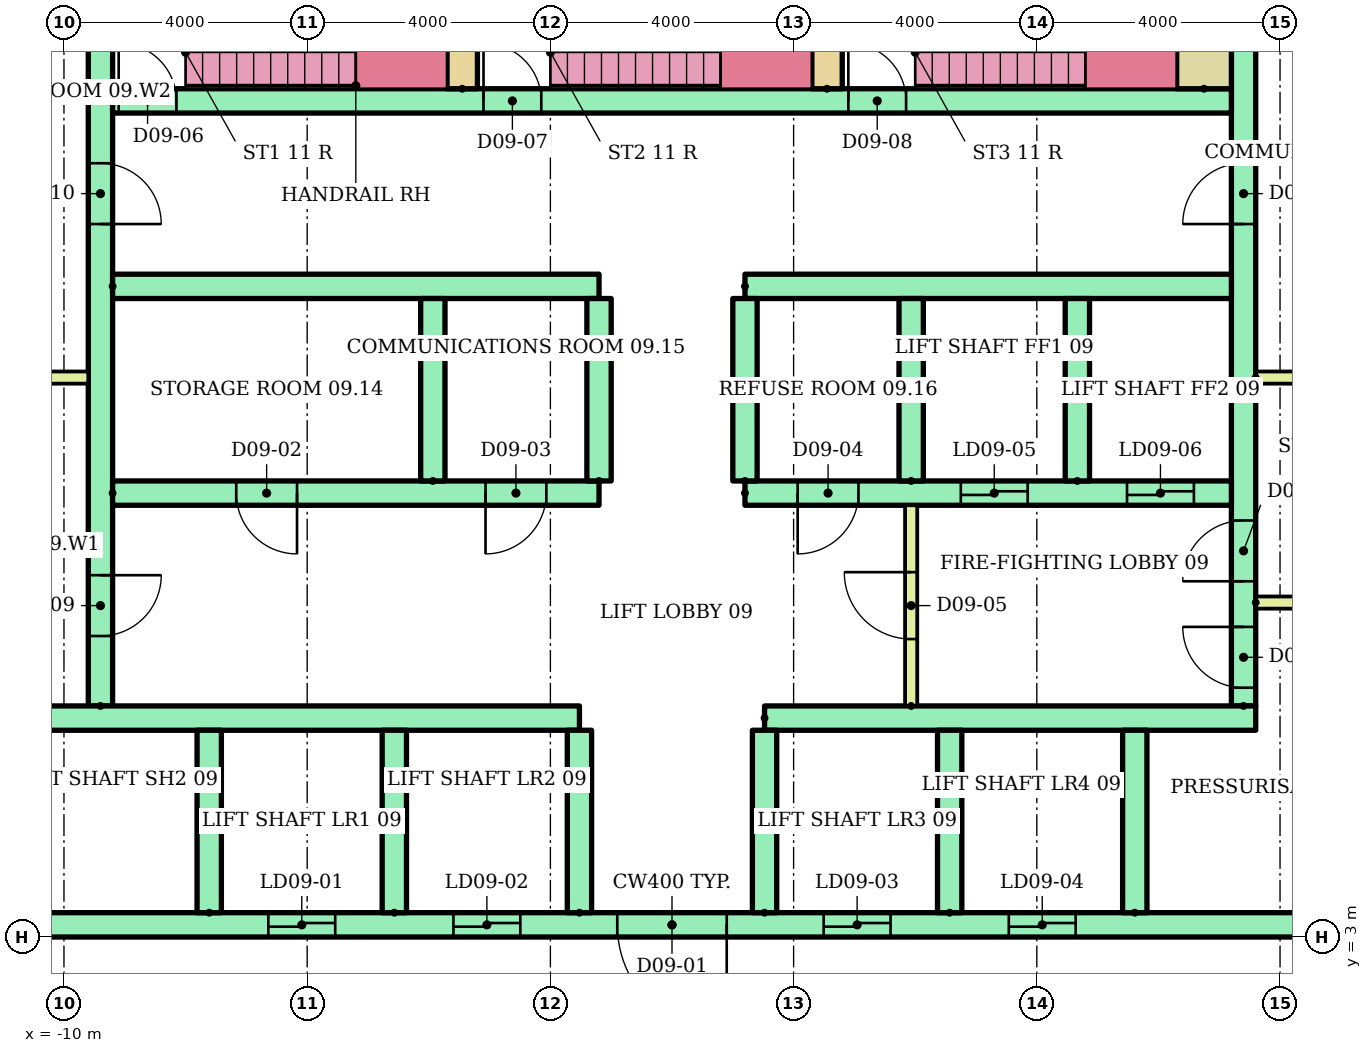
"""IFC4 building model, lengths in metres.
Left out: names, types, materials, properties, quantities, classifications, styles, units other than length and angle.
Written with IfcOpenShell. Run it as: python <this file> out.ifc"""

import sys

from ifc_helpers import new_model, si_unit, direction, frame, frame_2d, origin, place, context, subcontext, project, spatial, rectangle, extrude, element, fill, save


model = new_model("IFC4")
c1 = context("Model", 3, precision=1e-05, world=origin(), true_north=direction((0.0, 1.0)))
c2 = subcontext(c1, "Body", "Model", "MODEL_VIEW")
j1 = project(units=[si_unit("LENGTHUNIT", "METRE"), si_unit("PLANEANGLEUNIT", "RADIAN")], contexts=[c1])
p1 = place(None, origin())
s1 = spatial("IfcSite", under=j1, at=p1, CompositionType="ELEMENT")
p2 = place(p1, origin())
s2 = spatial("IfcBuilding", under=s1, at=p2, CompositionType="ELEMENT")
p3 = place(p2, frame((0.0, 0.0, 37.7)))
s3 = spatial("IfcBuildingStorey", under=s2, at=p3, CompositionType="ELEMENT", Elevation=37.7)
p4 = place(p3, frame((-9.4, 6.8, 0.0), z_axis=(0.0, 0.0, 1.0), x_axis=(0.0, 1.0, 0.0)))
e1 = element("IfcWall", 1, at=p4, inside=s3, PredefinedType="SHEAR", context=c2, shape_type="SweptSolid", body=[
    extrude(rectangle(XDim=12.7, YDim=0.4, at=frame_2d((6.35, 0.0))), origin(), (0.0, 0.0, 1.0), 3.62),
])
p5 = place(p4, frame((1.15, 0.0, 0.0)))
e2 = element("IfcOpeningElement", 2, at=p5, cuts=e1, PredefinedType="OPENING", context=c2, shape_type="SweptSolid", body=[
    extrude(rectangle(XDim=1.0, YDim=2.1, at=frame_2d((0.5, 1.05))), frame((0.0, 0.21, 0.0), z_axis=(0.0, -1.0, 0.0), x_axis=(1.0, 0.0, 0.0)), (0.0, 0.0, 1.0), 0.42),
])
p6 = place(p4, frame((7.925, 0.0, 0.0)))
e3 = element("IfcOpeningElement", 3, at=p6, cuts=e1, PredefinedType="OPENING", context=c2, shape_type="SweptSolid", body=[
    extrude(rectangle(XDim=1.0, YDim=2.1, at=frame_2d((0.5, 1.05))), frame((0.0, 0.21, 0.0), z_axis=(0.0, -1.0, 0.0), x_axis=(1.0, 0.0, 0.0)), (0.0, 0.0, 1.0), 0.42),
])
p7 = place(p3, frame((9.4, 6.8, 0.0), z_axis=(0.0, 0.0, 1.0), x_axis=(0.0, 1.0, 0.0)))
e4 = element("IfcWall", 4, at=p7, inside=s3, PredefinedType="SHEAR", context=c2, shape_type="SweptSolid", body=[
    extrude(rectangle(XDim=12.7, YDim=0.4, at=frame_2d((6.35, 0.0))), origin(), (0.0, 0.0, 1.0), 3.62),
])
p8 = place(p7, frame((0.3, 0.0, 0.0)))
e5 = element("IfcOpeningElement", 5, at=p8, cuts=e4, PredefinedType="OPENING", context=c2, shape_type="SweptSolid", body=[
    extrude(rectangle(XDim=1.0, YDim=2.1, at=frame_2d((0.5, 1.05))), frame((0.0, 0.21, 0.0), z_axis=(0.0, -1.0, 0.0), x_axis=(1.0, 0.0, 0.0)), (0.0, 0.0, 1.0), 0.42),
])
p9 = place(p7, frame((2.05, 0.0, 0.0)))
e6 = element("IfcOpeningElement", 6, at=p9, cuts=e4, PredefinedType="OPENING", context=c2, shape_type="SweptSolid", body=[
    extrude(rectangle(XDim=1.0, YDim=2.1, at=frame_2d((0.5, 1.05))), frame((0.0, 0.21, 0.0), z_axis=(0.0, -1.0, 0.0), x_axis=(1.0, 0.0, 0.0)), (0.0, 0.0, 1.0), 0.42),
])
p10 = place(p7, frame((7.925, 0.0, 0.0)))
e7 = element("IfcOpeningElement", 7, at=p10, cuts=e4, PredefinedType="OPENING", context=c2, shape_type="SweptSolid", body=[
    extrude(rectangle(XDim=1.0, YDim=2.1, at=frame_2d((0.5, 1.05))), frame((0.0, 0.21, 0.0), z_axis=(0.0, -1.0, 0.0), x_axis=(1.0, 0.0, 0.0)), (0.0, 0.0, 1.0), 0.42),
])
p11 = place(p3, frame((-13.5, 3.2, 0.0)))
e8 = element("IfcWall", 8, at=p11, inside=s3, PredefinedType="SHEAR", context=c2, shape_type="SweptSolid", body=[
    extrude(rectangle(XDim=27.0, YDim=0.4, at=frame_2d((13.5, 0.0))), origin(), (0.0, 0.0, 1.0), 3.62),
])
p12 = place(p11, frame((6.861, 0.0, 0.0)))
e9 = element("IfcOpeningElement", 9, at=p12, cuts=e8, PredefinedType="OPENING", context=c2, shape_type="SweptSolid", body=[
    extrude(rectangle(XDim=1.1, YDim=2.1, at=frame_2d((0.55, 1.05))), frame((0.0, 0.21, 0.0), z_axis=(0.0, -1.0, 0.0), x_axis=(1.0, 0.0, 0.0)), (0.0, 0.0, 1.0), 0.42),
])
p13 = place(p11, frame((9.906, 0.0, 0.0)))
e10 = element("IfcOpeningElement", 10, at=p13, cuts=e8, PredefinedType="OPENING", context=c2, shape_type="SweptSolid", body=[
    extrude(rectangle(XDim=1.1, YDim=2.1, at=frame_2d((0.55, 1.05))), frame((0.0, 0.21, 0.0), z_axis=(0.0, -1.0, 0.0), x_axis=(1.0, 0.0, 0.0)), (0.0, 0.0, 1.0), 0.42),
])
p14 = place(p11, frame((15.994, 0.0, 0.0)))
e11 = element("IfcOpeningElement", 11, at=p14, cuts=e8, PredefinedType="OPENING", context=c2, shape_type="SweptSolid", body=[
    extrude(rectangle(XDim=1.1, YDim=2.1, at=frame_2d((0.55, 1.05))), frame((0.0, 0.21, 0.0), z_axis=(0.0, -1.0, 0.0), x_axis=(1.0, 0.0, 0.0)), (0.0, 0.0, 1.0), 0.42),
])
p15 = place(p11, frame((19.039, 0.0, 0.0)))
e12 = element("IfcOpeningElement", 12, at=p15, cuts=e8, PredefinedType="OPENING", context=c2, shape_type="SweptSolid", body=[
    extrude(rectangle(XDim=1.1, YDim=2.1, at=frame_2d((0.55, 1.05))), frame((0.0, 0.21, 0.0), z_axis=(0.0, -1.0, 0.0), x_axis=(1.0, 0.0, 0.0)), (0.0, 0.0, 1.0), 0.42),
])
p16 = place(p11, frame((12.6, 0.0, 0.0)))
e13 = element("IfcOpeningElement", 13, at=p16, cuts=e8, PredefinedType="OPENING", context=c2, shape_type="SweptSolid", body=[
    extrude(rectangle(XDim=1.8, YDim=2.1, at=frame_2d((0.9, 1.05))), frame((0.0, 0.21, 0.0), z_axis=(0.0, -1.0, 0.0), x_axis=(1.0, 0.0, 0.0)), (0.0, 0.0, 1.0), 0.42),
])
p17 = place(p3, frame((-13.5, 6.6, 0.0)))
e14 = element("IfcWall", 14, at=p17, inside=s3, PredefinedType="SHEAR", context=c2, shape_type="SweptSolid", body=[
    extrude(rectangle(XDim=11.978, YDim=0.4, at=frame_2d((5.989, 0.0))), origin(), (0.0, 0.0, 1.0), 3.62),
])
p18 = place(p3, frame((1.522, 6.6, 0.0)))
e15 = element("IfcWall", 15, at=p18, inside=s3, PredefinedType="SHEAR", context=c2, shape_type="SweptSolid", body=[
    extrude(rectangle(XDim=8.078, YDim=0.4, at=frame_2d((4.039, 0.0))), origin(), (0.0, 0.0, 1.0), 3.62),
])
for number, where, z_axis, x_axis in (
    (16, (-7.611, 3.4, 0.0), (0.0, 0.0, 1.0), (0.0, 1.0, 0.0)),
    (17, (-4.567, 3.4, 0.0), (0.0, 0.0, 1.0), (0.0, 1.0, 0.0)),
    (18, (-1.522, 3.4, 0.0), (0.0, 0.0, 1.0), (0.0, 1.0, 0.0)),
    (19, (1.522, 3.4, 0.0), (0.0, 0.0, 1.0), (0.0, 1.0, 0.0)),
    (20, (4.567, 3.4, 0.0), (0.0, 0.0, 1.0), (0.0, 1.0, 0.0)),
    (21, (7.611, 3.4, 0.0), (0.0, 0.0, 1.0), (0.0, 1.0, 0.0)),
):
    element("IfcWall", number, at=place(p3, frame(where, z_axis=z_axis, x_axis=x_axis)), inside=s3, PredefinedType="SHEAR", context=c2, shape_type="SweptSolid", body=[
        extrude(rectangle(XDim=3.0, YDim=0.4, at=frame_2d((1.5, 0.0))), origin(), (0.0, 0.0, 1.0), 3.62),
    ])
p19 = place(p3, frame((-9.2, 10.3, 0.0)))
e22 = element("IfcWall", 22, at=p19, inside=s3, PredefinedType="SHEAR", context=c2, shape_type="SweptSolid", body=[
    extrude(rectangle(XDim=8.0, YDim=0.4, at=frame_2d((4.0, 0.0))), origin(), (0.0, 0.0, 1.0), 3.62),
])
p20 = place(p19, frame((2.033, 0.0, 0.0)))
e23 = element("IfcOpeningElement", 23, at=p20, cuts=e22, PredefinedType="OPENING", context=c2, shape_type="SweptSolid", body=[
    extrude(rectangle(XDim=1.0, YDim=2.1, at=frame_2d((0.5, 1.05))), frame((0.0, 0.21, 0.0), z_axis=(0.0, -1.0, 0.0), x_axis=(1.0, 0.0, 0.0)), (0.0, 0.0, 1.0), 0.42),
])
p21 = place(p19, frame((6.133, 0.0, 0.0)))
e24 = element("IfcOpeningElement", 24, at=p21, cuts=e22, PredefinedType="OPENING", context=c2, shape_type="SweptSolid", body=[
    extrude(rectangle(XDim=1.0, YDim=2.1, at=frame_2d((0.5, 1.05))), frame((0.0, 0.21, 0.0), z_axis=(0.0, -1.0, 0.0), x_axis=(1.0, 0.0, 0.0)), (0.0, 0.0, 1.0), 0.42),
])
p22 = place(p3, frame((-9.2, 13.7, 0.0)))
e25 = element("IfcWall", 25, at=p22, inside=s3, PredefinedType="SHEAR", context=c2, shape_type="SweptSolid", body=[
    extrude(rectangle(XDim=8.0, YDim=0.4, at=frame_2d((4.0, 0.0))), origin(), (0.0, 0.0, 1.0), 3.62),
])
p23 = place(p3, frame((1.2, 10.3, 0.0)))
e26 = element("IfcWall", 26, at=p23, inside=s3, PredefinedType="SHEAR", context=c2, shape_type="SweptSolid", body=[
    extrude(rectangle(XDim=8.0, YDim=0.4, at=frame_2d((4.0, 0.0))), origin(), (0.0, 0.0, 1.0), 3.62),
])
p24 = place(p23, frame((3.55, 0.0, 0.0)))
e27 = element("IfcOpeningElement", 27, at=p24, cuts=e26, PredefinedType="OPENING", context=c2, shape_type="SweptSolid", body=[
    extrude(rectangle(XDim=1.1, YDim=2.1, at=frame_2d((0.55, 1.05))), frame((0.0, 0.21, 0.0), z_axis=(0.0, -1.0, 0.0), x_axis=(1.0, 0.0, 0.0)), (0.0, 0.0, 1.0), 0.42),
])
p25 = place(p23, frame((6.283, 0.0, 0.0)))
e28 = element("IfcOpeningElement", 28, at=p25, cuts=e26, PredefinedType="OPENING", context=c2, shape_type="SweptSolid", body=[
    extrude(rectangle(XDim=1.1, YDim=2.1, at=frame_2d((0.55, 1.05))), frame((0.0, 0.21, 0.0), z_axis=(0.0, -1.0, 0.0), x_axis=(1.0, 0.0, 0.0)), (0.0, 0.0, 1.0), 0.42),
])
p26 = place(p23, frame((0.867, 0.0, 0.0)))
e29 = element("IfcOpeningElement", 29, at=p26, cuts=e26, PredefinedType="OPENING", context=c2, shape_type="SweptSolid", body=[
    extrude(rectangle(XDim=1.0, YDim=2.1, at=frame_2d((0.5, 1.05))), frame((0.0, 0.21, 0.0), z_axis=(0.0, -1.0, 0.0), x_axis=(1.0, 0.0, 0.0)), (0.0, 0.0, 1.0), 0.42),
])
p27 = place(p3, frame((1.2, 13.7, 0.0)))
e30 = element("IfcWall", 30, at=p27, inside=s3, PredefinedType="SHEAR", context=c2, shape_type="SweptSolid", body=[
    extrude(rectangle(XDim=8.0, YDim=0.4, at=frame_2d((4.0, 0.0))), origin(), (0.0, 0.0, 1.0), 3.62),
])
for number, where, z_axis, x_axis in (
    (31, (-3.933, 10.5, 0.0), (0.0, 0.0, 1.0), (0.0, 1.0, 0.0)),
    (32, (-1.2, 10.5, 0.0), (0.0, 0.0, 1.0), (0.0, 1.0, 0.0)),
    (33, (1.2, 10.5, 0.0), (0.0, 0.0, 1.0), (0.0, 1.0, 0.0)),
    (34, (3.933, 10.5, 0.0), (0.0, 0.0, 1.0), (0.0, 1.0, 0.0)),
    (35, (6.667, 10.5, 0.0), (0.0, 0.0, 1.0), (0.0, 1.0, 0.0)),
):
    element("IfcWall", number, at=place(p3, frame(where, z_axis=z_axis, x_axis=x_axis)), inside=s3, PredefinedType="SHEAR", context=c2, shape_type="SweptSolid", body=[
        extrude(rectangle(XDim=3.0, YDim=0.4, at=frame_2d((1.5, 0.0))), origin(), (0.0, 0.0, 1.0), 3.62),
    ])
p28 = place(p3, frame((3.933, 6.8, 0.0), z_axis=(0.0, 0.0, 1.0), x_axis=(0.0, 1.0, 0.0)))
e36 = element("IfcWall", 36, at=p28, inside=s3, PredefinedType="PARTITIONING", context=c2, shape_type="SweptSolid", body=[
    extrude(rectangle(XDim=3.3, YDim=0.2, at=frame_2d((1.65, 0.0))), origin(), (0.0, 0.0, 1.0), 3.62),
])
p29 = place(p28, frame((1.1, 0.0, 0.0)))
e37 = element("IfcOpeningElement", 37, at=p29, cuts=e36, PredefinedType="OPENING", context=c2, shape_type="SweptSolid", body=[
    extrude(rectangle(XDim=1.1, YDim=2.1, at=frame_2d((0.55, 1.05))), frame((0.0, 0.11, 0.0), z_axis=(0.0, -1.0, 0.0), x_axis=(1.0, 0.0, 0.0)), (0.0, 0.0, 1.0), 0.22),
])
p30 = place(p3, frame((-9.2, 16.75, 0.0)))
e38 = element("IfcWall", 38, at=p30, inside=s3, PredefinedType="SHEAR", context=c2, shape_type="SweptSolid", body=[
    extrude(rectangle(XDim=18.4, YDim=0.4, at=frame_2d((9.2, 0.0))), origin(), (0.0, 0.0, 1.0), 3.62),
])
p31 = place(p30, frame((0.1, 0.0, 0.0)))
e39 = element("IfcOpeningElement", 39, at=p31, cuts=e38, PredefinedType="OPENING", context=c2, shape_type="SweptSolid", body=[
    extrude(rectangle(XDim=0.95, YDim=2.1, at=frame_2d((0.475, 1.05))), frame((0.0, 0.21, 0.0), z_axis=(0.0, -1.0, 0.0), x_axis=(1.0, 0.0, 0.0)), (0.0, 0.0, 1.0), 0.42),
])
p32 = place(p30, frame((6.1, 0.0, 0.0)))
e40 = element("IfcOpeningElement", 40, at=p32, cuts=e38, PredefinedType="OPENING", context=c2, shape_type="SweptSolid", body=[
    extrude(rectangle(XDim=0.95, YDim=2.1, at=frame_2d((0.475, 1.05))), frame((0.0, 0.21, 0.0), z_axis=(0.0, -1.0, 0.0), x_axis=(1.0, 0.0, 0.0)), (0.0, 0.0, 1.0), 0.42),
])
p33 = place(p30, frame((12.1, 0.0, 0.0)))
e41 = element("IfcOpeningElement", 41, at=p33, cuts=e38, PredefinedType="OPENING", context=c2, shape_type="SweptSolid", body=[
    extrude(rectangle(XDim=0.95, YDim=2.1, at=frame_2d((0.475, 1.05))), frame((0.0, 0.21, 0.0), z_axis=(0.0, -1.0, 0.0), x_axis=(1.0, 0.0, 0.0)), (0.0, 0.0, 1.0), 0.42),
])
for number, where, z_axis, x_axis in (
    (42, (-3.45, 16.95, 0.0), (0.0, 0.0, 1.0), (0.0, 1.0, 0.0)),
    (43, (2.55, 16.95, 0.0), (0.0, 0.0, 1.0), (0.0, 1.0, 0.0)),
):
    element("IfcWall", number, at=place(p3, frame(where, z_axis=z_axis, x_axis=x_axis)), inside=s3, PredefinedType="SHEAR", context=c2, shape_type="SweptSolid", body=[
        extrude(rectangle(XDim=2.55, YDim=0.5, at=frame_2d((1.275, 0.0))), origin(), (0.0, 0.0, 1.0), 3.62),
    ])
p34 = place(p3, frame((8.75, 16.95, 0.0), z_axis=(0.0, 0.0, 1.0), x_axis=(0.0, 1.0, 0.0)))
e44 = element("IfcWall", 44, at=p34, inside=s3, PredefinedType="SHEAR", context=c2, shape_type="SweptSolid", body=[
    extrude(rectangle(XDim=2.55, YDim=0.9, at=frame_2d((1.275, 0.0))), origin(), (0.0, 0.0, 1.0), 3.62),
])
for number, where in (
    (45, (-13.5, 12.2, 0.0)),
    (46, (9.6, 8.5, 0.0)),
    (47, (9.6, 12.2, 0.0)),
):
    element("IfcWall", number, at=place(p3, frame(where)), inside=s3, PredefinedType="PARTITIONING", context=c2, shape_type="SweptSolid", body=[
        extrude(rectangle(XDim=3.9, YDim=0.2, at=frame_2d((1.95, 0.0))), origin(), (0.0, 0.0, 1.0), 3.62),
    ])
p35 = place(p12, origin())
e48 = element("IfcDoor", 48, at=p35, inside=s3, OperationType="SLIDING_TO_LEFT", PredefinedType="DOOR", context=c2, shape_type="SweptSolid", body=[
    extrude(rectangle(XDim=1.1, YDim=2.1, at=frame_2d((0.55, 1.05))), frame((0.0, 0.025, 0.0), z_axis=(0.0, -1.0, 0.0), x_axis=(1.0, 0.0, 0.0)), (0.0, 0.0, 1.0), 0.05),
])
fill(e9, e48)
p36 = place(p13, origin())
e49 = element("IfcDoor", 49, at=p36, inside=s3, OperationType="SLIDING_TO_LEFT", PredefinedType="DOOR", context=c2, shape_type="SweptSolid", body=[
    extrude(rectangle(XDim=1.1, YDim=2.1, at=frame_2d((0.55, 1.05))), frame((0.0, 0.025, 0.0), z_axis=(0.0, -1.0, 0.0), x_axis=(1.0, 0.0, 0.0)), (0.0, 0.0, 1.0), 0.05),
])
fill(e10, e49)
p37 = place(p14, origin())
e50 = element("IfcDoor", 50, at=p37, inside=s3, OperationType="SLIDING_TO_LEFT", PredefinedType="DOOR", context=c2, shape_type="SweptSolid", body=[
    extrude(rectangle(XDim=1.1, YDim=2.1, at=frame_2d((0.55, 1.05))), frame((0.0, 0.025, 0.0), z_axis=(0.0, -1.0, 0.0), x_axis=(1.0, 0.0, 0.0)), (0.0, 0.0, 1.0), 0.05),
])
fill(e11, e50)
p38 = place(p15, origin())
e51 = element("IfcDoor", 51, at=p38, inside=s3, OperationType="SLIDING_TO_LEFT", PredefinedType="DOOR", context=c2, shape_type="SweptSolid", body=[
    extrude(rectangle(XDim=1.1, YDim=2.1, at=frame_2d((0.55, 1.05))), frame((0.0, 0.025, 0.0), z_axis=(0.0, -1.0, 0.0), x_axis=(1.0, 0.0, 0.0)), (0.0, 0.0, 1.0), 0.05),
])
fill(e12, e51)
p39 = place(p16, frame((1.8, 0.0, 0.0), z_axis=(0.0, 0.0, 1.0), x_axis=(-1.0, 0.0, 0.0)))
e52 = element("IfcDoor", 52, at=p39, inside=s3, OperationType="DOUBLE_DOOR_SINGLE_SWING", PredefinedType="DOOR", context=c2, shape_type="SweptSolid", body=[
    extrude(rectangle(XDim=1.8, YDim=2.1, at=frame_2d((0.9, 1.05))), frame((0.0, 0.025, 0.0), z_axis=(0.0, -1.0, 0.0), x_axis=(1.0, 0.0, 0.0)), (0.0, 0.0, 1.0), 0.05),
])
fill(e13, e52)
p40 = place(p24, origin())
e53 = element("IfcDoor", 53, at=p40, inside=s3, OperationType="SLIDING_TO_LEFT", PredefinedType="DOOR", context=c2, shape_type="SweptSolid", body=[
    extrude(rectangle(XDim=1.1, YDim=2.1, at=frame_2d((0.55, 1.05))), frame((0.0, 0.025, 0.0), z_axis=(0.0, -1.0, 0.0), x_axis=(1.0, 0.0, 0.0)), (0.0, 0.0, 1.0), 0.05),
])
fill(e27, e53)
p41 = place(p25, origin())
e54 = element("IfcDoor", 54, at=p41, inside=s3, OperationType="SLIDING_TO_LEFT", PredefinedType="DOOR", context=c2, shape_type="SweptSolid", body=[
    extrude(rectangle(XDim=1.1, YDim=2.1, at=frame_2d((0.55, 1.05))), frame((0.0, 0.025, 0.0), z_axis=(0.0, -1.0, 0.0), x_axis=(1.0, 0.0, 0.0)), (0.0, 0.0, 1.0), 0.05),
])
fill(e28, e54)
p42 = place(p20, frame((1.0, 0.0, 0.0), z_axis=(0.0, 0.0, 1.0), x_axis=(-1.0, 0.0, 0.0)))
e55 = element("IfcDoor", 55, at=p42, inside=s3, OperationType="SINGLE_SWING_RIGHT", PredefinedType="DOOR", context=c2, shape_type="SweptSolid", body=[
    extrude(rectangle(XDim=1.0, YDim=2.1, at=frame_2d((0.5, 1.05))), frame((0.0, 0.025, 0.0), z_axis=(0.0, -1.0, 0.0), x_axis=(1.0, 0.0, 0.0)), (0.0, 0.0, 1.0), 0.05),
])
fill(e23, e55)
p43 = place(p21, frame((1.0, 0.0, 0.0), z_axis=(0.0, 0.0, 1.0), x_axis=(-1.0, 0.0, 0.0)))
e56 = element("IfcDoor", 56, at=p43, inside=s3, OperationType="SINGLE_SWING_LEFT", PredefinedType="DOOR", context=c2, shape_type="SweptSolid", body=[
    extrude(rectangle(XDim=1.0, YDim=2.1, at=frame_2d((0.5, 1.05))), frame((0.0, 0.025, 0.0), z_axis=(0.0, -1.0, 0.0), x_axis=(1.0, 0.0, 0.0)), (0.0, 0.0, 1.0), 0.05),
])
fill(e24, e56)
p44 = place(p26, frame((1.0, 0.0, 0.0), z_axis=(0.0, 0.0, 1.0), x_axis=(-1.0, 0.0, 0.0)))
e57 = element("IfcDoor", 57, at=p44, inside=s3, OperationType="SINGLE_SWING_LEFT", PredefinedType="DOOR", context=c2, shape_type="SweptSolid", body=[
    extrude(rectangle(XDim=1.0, YDim=2.1, at=frame_2d((0.5, 1.05))), frame((0.0, 0.025, 0.0), z_axis=(0.0, -1.0, 0.0), x_axis=(1.0, 0.0, 0.0)), (0.0, 0.0, 1.0), 0.05),
])
fill(e29, e57)
p45 = place(p29, origin())
e58 = element("IfcDoor", 58, at=p45, inside=s3, OperationType="SINGLE_SWING_RIGHT", PredefinedType="DOOR", context=c2, shape_type="SweptSolid", body=[
    extrude(rectangle(XDim=1.1, YDim=2.1, at=frame_2d((0.55, 1.05))), frame((0.0, 0.025, 0.0), z_axis=(0.0, -1.0, 0.0), x_axis=(1.0, 0.0, 0.0)), (0.0, 0.0, 1.0), 0.05),
])
fill(e37, e58)
p46 = place(p31, origin())
e59 = element("IfcDoor", 59, at=p46, inside=s3, OperationType="SINGLE_SWING_LEFT", PredefinedType="DOOR", context=c2, shape_type="SweptSolid", body=[
    extrude(rectangle(XDim=0.95, YDim=2.1, at=frame_2d((0.475, 1.05))), frame((0.0, 0.025, 0.0), z_axis=(0.0, -1.0, 0.0), x_axis=(1.0, 0.0, 0.0)), (0.0, 0.0, 1.0), 0.05),
])
fill(e39, e59)
p47 = place(p32, origin())
e60 = element("IfcDoor", 60, at=p47, inside=s3, OperationType="SINGLE_SWING_LEFT", PredefinedType="DOOR", context=c2, shape_type="SweptSolid", body=[
    extrude(rectangle(XDim=0.95, YDim=2.1, at=frame_2d((0.475, 1.05))), frame((0.0, 0.025, 0.0), z_axis=(0.0, -1.0, 0.0), x_axis=(1.0, 0.0, 0.0)), (0.0, 0.0, 1.0), 0.05),
])
fill(e40, e60)
p48 = place(p33, origin())
e61 = element("IfcDoor", 61, at=p48, inside=s3, OperationType="SINGLE_SWING_LEFT", PredefinedType="DOOR", context=c2, shape_type="SweptSolid", body=[
    extrude(rectangle(XDim=0.95, YDim=2.1, at=frame_2d((0.475, 1.05))), frame((0.0, 0.025, 0.0), z_axis=(0.0, -1.0, 0.0), x_axis=(1.0, 0.0, 0.0)), (0.0, 0.0, 1.0), 0.05),
])
fill(e41, e61)
p49 = place(p5, frame((1.0, 0.0, 0.0), z_axis=(0.0, 0.0, 1.0), x_axis=(-1.0, 0.0, 0.0)))
e62 = element("IfcDoor", 62, at=p49, inside=s3, OperationType="SINGLE_SWING_RIGHT", PredefinedType="DOOR", context=c2, shape_type="SweptSolid", body=[
    extrude(rectangle(XDim=1.0, YDim=2.1, at=frame_2d((0.5, 1.05))), frame((0.0, 0.025, 0.0), z_axis=(0.0, -1.0, 0.0), x_axis=(1.0, 0.0, 0.0)), (0.0, 0.0, 1.0), 0.05),
])
fill(e2, e62)
p50 = place(p6, frame((1.0, 0.0, 0.0), z_axis=(0.0, 0.0, 1.0), x_axis=(-1.0, 0.0, 0.0)))
e63 = element("IfcDoor", 63, at=p50, inside=s3, OperationType="SINGLE_SWING_LEFT", PredefinedType="DOOR", context=c2, shape_type="SweptSolid", body=[
    extrude(rectangle(XDim=1.0, YDim=2.1, at=frame_2d((0.5, 1.05))), frame((0.0, 0.025, 0.0), z_axis=(0.0, -1.0, 0.0), x_axis=(1.0, 0.0, 0.0)), (0.0, 0.0, 1.0), 0.05),
])
fill(e3, e63)
p51 = place(p8, origin())
e64 = element("IfcDoor", 64, at=p51, inside=s3, OperationType="SINGLE_SWING_RIGHT", PredefinedType="DOOR", context=c2, shape_type="SweptSolid", body=[
    extrude(rectangle(XDim=1.0, YDim=2.1, at=frame_2d((0.5, 1.05))), frame((0.0, 0.025, 0.0), z_axis=(0.0, -1.0, 0.0), x_axis=(1.0, 0.0, 0.0)), (0.0, 0.0, 1.0), 0.05),
])
fill(e5, e64)
p52 = place(p9, origin())
e65 = element("IfcDoor", 65, at=p52, inside=s3, OperationType="SINGLE_SWING_LEFT", PredefinedType="DOOR", context=c2, shape_type="SweptSolid", body=[
    extrude(rectangle(XDim=1.0, YDim=2.1, at=frame_2d((0.5, 1.05))), frame((0.0, 0.025, 0.0), z_axis=(0.0, -1.0, 0.0), x_axis=(1.0, 0.0, 0.0)), (0.0, 0.0, 1.0), 0.05),
])
fill(e6, e65)
p53 = place(p10, origin())
e66 = element("IfcDoor", 66, at=p53, inside=s3, OperationType="SINGLE_SWING_LEFT", PredefinedType="DOOR", context=c2, shape_type="SweptSolid", body=[
    extrude(rectangle(XDim=1.0, YDim=2.1, at=frame_2d((0.5, 1.05))), frame((0.0, 0.025, 0.0), z_axis=(0.0, -1.0, 0.0), x_axis=(1.0, 0.0, 0.0)), (0.0, 0.0, 1.0), 0.05),
])
fill(e7, e66)
save(model, sys.argv[1])
